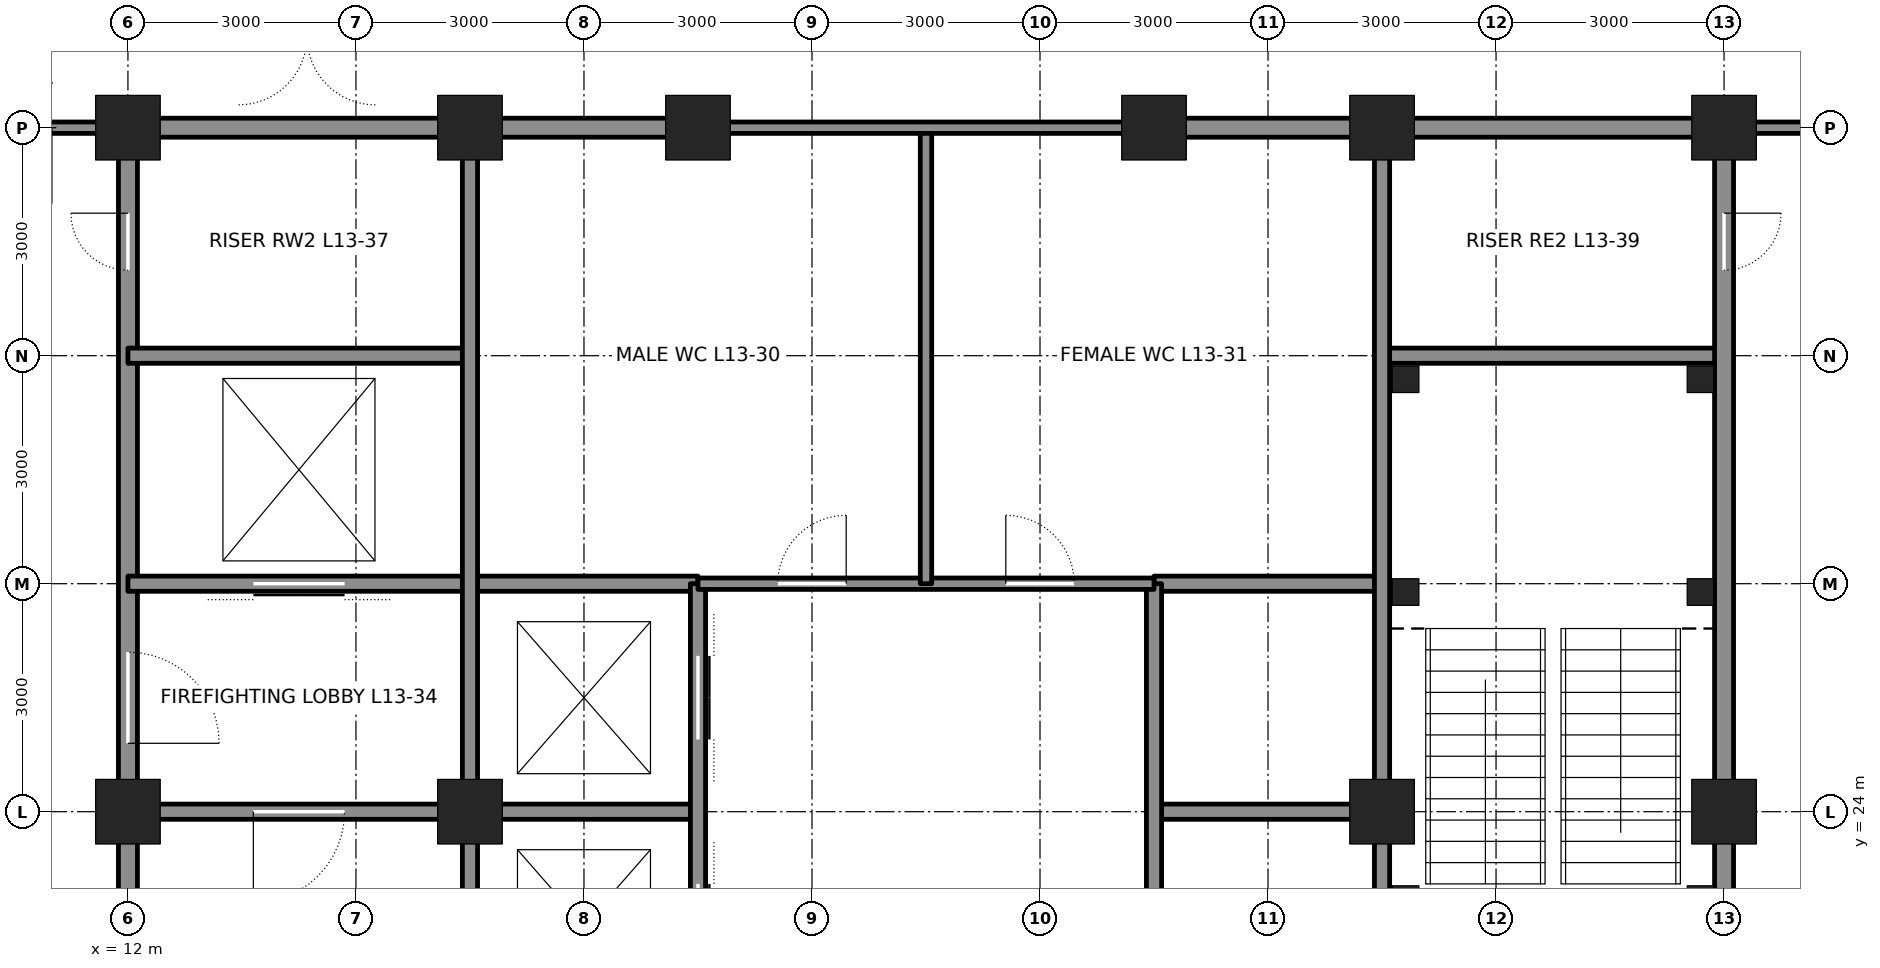
"""IFC4 building model, lengths in metres.
Left out: names, types, materials, properties, quantities, classifications, styles, units other than length and angle.
Written with IfcOpenShell. Run it as: python <this file> out.ifc"""

import sys

from ifc_helpers import new_model, si_unit, direction, frame, frame_2d, origin, origin_2d, place, context, subcontext, project, spatial, rectangle, hollow_rectangle, extrude, element, fill, save


model = new_model("IFC4")
c1 = context("Model", 3, precision=1e-05, world=origin(), true_north=direction((0.0, 1.0)))
c2 = subcontext(c1, "Body", "Model", "MODEL_VIEW")
j1 = project(units=[si_unit("LENGTHUNIT", "METRE"), si_unit("PLANEANGLEUNIT", "RADIAN")], contexts=[c1])
p1 = place(None, origin())
s1 = spatial("IfcSite", under=j1, at=p1, CompositionType="ELEMENT")
p2 = place(p1, origin())
s2 = spatial("IfcBuilding", under=s1, at=p2, CompositionType="ELEMENT")
p3 = place(p2, frame((0.0, 0.0, 64.8)))
s3 = spatial("IfcBuildingStorey", under=s2, at=p3, CompositionType="ELEMENT", Elevation=64.8)
for number, where, z_axis, x_axis in (
    (1, (12.0, 33.0, 0.0), (0.0, 0.0, 1.0), (1.0, 0.0, 0.0)),
    (2, (16.5, 33.0, 0.0), (0.0, 0.0, 1.0), (1.0, 0.0, 0.0)),
    (3, (19.5, 33.0, 0.0), (0.0, 0.0, 1.0), (1.0, 0.0, 0.0)),
    (4, (25.5, 33.0, 0.0), (0.0, 0.0, 1.0), (1.0, 0.0, 0.0)),
    (5, (28.5, 33.0, 0.0), (0.0, 0.0, 1.0), (1.0, 0.0, 0.0)),
    (6, (33.0, 33.0, 0.0), (0.0, 0.0, 1.0), (1.0, 0.0, 0.0)),
    (7, (12.0, 24.0, 0.0), (0.0, 0.0, 1.0), (1.0, 0.0, 0.0)),
    (8, (33.0, 24.0, 0.0), (0.0, 0.0, 1.0), (1.0, 0.0, 0.0)),
    (9, (16.5, 24.0, 0.0), (0.0, 0.0, 1.0), (1.0, 0.0, 0.0)),
    (10, (28.5, 24.0, 0.0), (0.0, 0.0, 1.0), (1.0, 0.0, 0.0)),
):
    element("IfcColumn", number, at=place(p3, frame(where, z_axis=z_axis, x_axis=x_axis)), inside=s3, PredefinedType="COLUMN", context=c2, shape_type="SweptSolid", body=[
        extrude(hollow_rectangle(XDim=0.85, YDim=0.85, WallThickness=0.085, at=origin_2d()), origin(), (0.0, 0.0, 1.0), 4.5),
    ])
p4 = place(p3, frame((12.0, 21.25, 0.0), z_axis=(0.0, 0.0, 1.0), x_axis=(0.0, 1.0, 0.0)))
e11 = element("IfcWall", 11, at=p4, inside=s3, PredefinedType="SOLIDWALL", context=c2, shape_type="SweptSolid", body=[
    extrude(rectangle(XDim=2.5, YDim=0.25, at=frame_2d((1.25, 0.0))), origin(), (0.0, 0.0, 1.0), 3.113),
])
p5 = place(p3, frame((12.0, 24.25, 0.0), z_axis=(0.0, 0.0, 1.0), x_axis=(0.0, 1.0, 0.0)))
e12 = element("IfcWall", 12, at=p5, inside=s3, PredefinedType="SOLIDWALL", context=c2, shape_type="SweptSolid", body=[
    extrude(rectangle(XDim=8.5, YDim=0.25, at=frame_2d((4.25, 0.0))), origin(), (0.0, 0.0, 1.0), 3.113),
])
p6 = place(p5, frame((0.65, 0.0, 0.0)))
e13 = element("IfcOpeningElement", 13, at=p6, cuts=e12, PredefinedType="OPENING", context=c2, shape_type="SweptSolid", body=[
    extrude(rectangle(XDim=1.2, YDim=2.1, at=frame_2d((0.6, 1.05))), frame((0.0, 0.135, 0.0), z_axis=(0.0, -1.0, 0.0), x_axis=(1.0, 0.0, 0.0)), (0.0, 0.0, 1.0), 0.27),
])
p7 = place(p5, frame((6.875, 0.0, 0.0)))
e14 = element("IfcOpeningElement", 14, at=p7, cuts=e12, PredefinedType="OPENING", context=c2, shape_type="SweptSolid", body=[
    extrude(rectangle(XDim=0.75, YDim=2.1, at=frame_2d((0.375, 1.05))), frame((0.0, 0.135, 0.0), z_axis=(0.0, -1.0, 0.0), x_axis=(1.0, 0.0, 0.0)), (0.0, 0.0, 1.0), 0.27),
])
p8 = place(p3, frame((12.25, 24.0, 0.0), z_axis=(0.0, 0.0, 1.0), x_axis=(1.0, 0.0, 0.0)))
e15 = element("IfcWall", 15, at=p8, inside=s3, PredefinedType="SOLIDWALL", context=c2, shape_type="SweptSolid", body=[
    extrude(rectangle(XDim=4.0, YDim=0.2, at=frame_2d((2.0, 0.0))), origin(), (0.0, 0.0, 1.0), 3.39),
])
p9 = place(p8, frame((1.4, 0.0, 0.0)))
e16 = element("IfcOpeningElement", 16, at=p9, cuts=e15, PredefinedType="OPENING", context=c2, shape_type="SweptSolid", body=[
    extrude(rectangle(XDim=1.2, YDim=2.1, at=frame_2d((0.6, 1.05))), frame((0.0, 0.11, 0.0), z_axis=(0.0, -1.0, 0.0), x_axis=(1.0, 0.0, 0.0)), (0.0, 0.0, 1.0), 0.22),
])
for number, where, z_axis, x_axis in (
    (17, (16.75, 24.0, 0.0), (0.0, 0.0, 1.0), (1.0, 0.0, 0.0)),
    (18, (25.5, 24.0, 0.0), (0.0, 0.0, 1.0), (1.0, 0.0, 0.0)),
):
    element("IfcWall", number, at=place(p3, frame(where, z_axis=z_axis, x_axis=x_axis)), inside=s3, PredefinedType="SOLIDWALL", context=c2, shape_type="SweptSolid", body=[
        extrude(rectangle(XDim=2.75, YDim=0.2, at=frame_2d((1.375, 0.0))), origin(), (0.0, 0.0, 1.0), 3.39),
    ])
p10 = place(p3, frame((12.0, 27.0, 0.0), z_axis=(0.0, 0.0, 1.0), x_axis=(1.0, 0.0, 0.0)))
e19 = element("IfcWall", 19, at=p10, inside=s3, PredefinedType="SOLIDWALL", context=c2, shape_type="SweptSolid", body=[
    extrude(rectangle(XDim=7.5, YDim=0.2, at=frame_2d((3.75, 0.0))), origin(), (0.0, 0.0, 1.0), 4.34),
])
p11 = place(p10, frame((1.65, 0.0, 0.0)))
e20 = element("IfcOpeningElement", 20, at=p11, cuts=e19, PredefinedType="OPENING", context=c2, shape_type="SweptSolid", body=[
    extrude(rectangle(XDim=1.2, YDim=2.1, at=frame_2d((0.6, 1.05))), frame((0.0, 0.11, 0.0), z_axis=(0.0, -1.0, 0.0), x_axis=(1.0, 0.0, 0.0)), (0.0, 0.0, 1.0), 0.22),
])
p12 = place(p3, frame((25.5, 27.0, 0.0), z_axis=(0.0, 0.0, 1.0), x_axis=(1.0, 0.0, 0.0)))
e21 = element("IfcWall", 21, at=p12, inside=s3, PredefinedType="SOLIDWALL", context=c2, shape_type="SweptSolid", body=[
    extrude(rectangle(XDim=3.0, YDim=0.2, at=frame_2d((1.5, 0.0))), origin(), (0.0, 0.0, 1.0), 4.34),
])
for number, where, z_axis, x_axis in (
    (22, (12.0, 30.0, 0.0), (0.0, 0.0, 1.0), (1.0, 0.0, 0.0)),
    (23, (28.5, 30.0, 0.0), (0.0, 0.0, 1.0), (1.0, 0.0, 0.0)),
):
    element("IfcWall", number, at=place(p3, frame(where, z_axis=z_axis, x_axis=x_axis)), inside=s3, PredefinedType="SOLIDWALL", context=c2, shape_type="SweptSolid", body=[
        extrude(rectangle(XDim=4.5, YDim=0.2, at=frame_2d((2.25, 0.0))), origin(), (0.0, 0.0, 1.0), 4.34),
    ])
p13 = place(p3, frame((12.25, 33.0, 0.0), z_axis=(0.0, 0.0, 1.0), x_axis=(1.0, 0.0, 0.0)))
e24 = element("IfcWall", 24, at=p13, inside=s3, PredefinedType="SOLIDWALL", context=c2, shape_type="SweptSolid", body=[
    extrude(rectangle(XDim=4.0, YDim=0.25, at=frame_2d((2.0, 0.0))), origin(), (0.0, 0.0, 1.0), 3.181),
])
for number, where, z_axis, x_axis in (
    (25, (16.75, 33.0, 0.0), (0.0, 0.0, 1.0), (1.0, 0.0, 0.0)),
    (26, (25.75, 33.0, 0.0), (0.0, 0.0, 1.0), (1.0, 0.0, 0.0)),
):
    element("IfcWall", number, at=place(p3, frame(where, z_axis=z_axis, x_axis=x_axis)), inside=s3, PredefinedType="SOLIDWALL", context=c2, shape_type="SweptSolid", body=[
        extrude(rectangle(XDim=2.5, YDim=0.25, at=frame_2d((1.25, 0.0))), origin(), (0.0, 0.0, 1.0), 3.181),
    ])
p14 = place(p3, frame((28.75, 33.0, 0.0), z_axis=(0.0, 0.0, 1.0), x_axis=(1.0, 0.0, 0.0)))
e27 = element("IfcWall", 27, at=p14, inside=s3, PredefinedType="SOLIDWALL", context=c2, shape_type="SweptSolid", body=[
    extrude(rectangle(XDim=4.0, YDim=0.25, at=frame_2d((2.0, 0.0))), origin(), (0.0, 0.0, 1.0), 3.181),
])
p15 = place(p3, frame((16.5, 21.25, 0.0), z_axis=(0.0, 0.0, 1.0), x_axis=(0.0, 1.0, 0.0)))
e28 = element("IfcWall", 28, at=p15, inside=s3, PredefinedType="SOLIDWALL", context=c2, shape_type="SweptSolid", body=[
    extrude(rectangle(XDim=2.5, YDim=0.2, at=frame_2d((1.25, 0.0))), origin(), (0.0, 0.0, 1.0), 3.413),
])
p16 = place(p3, frame((16.5, 24.25, 0.0), z_axis=(0.0, 0.0, 1.0), x_axis=(0.0, 1.0, 0.0)))
e29 = element("IfcWall", 29, at=p16, inside=s3, PredefinedType="SOLIDWALL", context=c2, shape_type="SweptSolid", body=[
    extrude(rectangle(XDim=8.5, YDim=0.2, at=frame_2d((4.25, 0.0))), origin(), (0.0, 0.0, 1.0), 3.413),
])
p17 = place(p3, frame((19.5, 15.0, 0.0), z_axis=(0.0, 0.0, 1.0), x_axis=(0.0, 1.0, 0.0)))
e30 = element("IfcWall", 30, at=p17, inside=s3, PredefinedType="SOLIDWALL", context=c2, shape_type="SweptSolid", body=[
    extrude(rectangle(XDim=12.0, YDim=0.2, at=frame_2d((6.0, 0.0))), origin(), (0.0, 0.0, 1.0), 3.365),
])
p18 = place(p17, frame((0.95, 0.0, 0.0)))
e31 = element("IfcOpeningElement", 31, at=p18, cuts=e30, PredefinedType="OPENING", context=c2, shape_type="SweptSolid", body=[
    extrude(rectangle(XDim=1.1, YDim=2.1, at=frame_2d((0.55, 1.05))), frame((0.0, 0.11, 0.0), z_axis=(0.0, -1.0, 0.0), x_axis=(1.0, 0.0, 0.0)), (0.0, 0.0, 1.0), 0.22),
])
p19 = place(p17, frame((3.95, 0.0, 0.0)))
e32 = element("IfcOpeningElement", 32, at=p19, cuts=e30, PredefinedType="OPENING", context=c2, shape_type="SweptSolid", body=[
    extrude(rectangle(XDim=1.1, YDim=2.1, at=frame_2d((0.55, 1.05))), frame((0.0, 0.11, 0.0), z_axis=(0.0, -1.0, 0.0), x_axis=(1.0, 0.0, 0.0)), (0.0, 0.0, 1.0), 0.22),
])
p20 = place(p17, frame((6.95, 0.0, 0.0)))
e33 = element("IfcOpeningElement", 33, at=p20, cuts=e30, PredefinedType="OPENING", context=c2, shape_type="SweptSolid", body=[
    extrude(rectangle(XDim=1.1, YDim=2.1, at=frame_2d((0.55, 1.05))), frame((0.0, 0.11, 0.0), z_axis=(0.0, -1.0, 0.0), x_axis=(1.0, 0.0, 0.0)), (0.0, 0.0, 1.0), 0.22),
])
p21 = place(p17, frame((9.95, 0.0, 0.0)))
e34 = element("IfcOpeningElement", 34, at=p21, cuts=e30, PredefinedType="OPENING", context=c2, shape_type="SweptSolid", body=[
    extrude(rectangle(XDim=1.1, YDim=2.1, at=frame_2d((0.55, 1.05))), frame((0.0, 0.11, 0.0), z_axis=(0.0, -1.0, 0.0), x_axis=(1.0, 0.0, 0.0)), (0.0, 0.0, 1.0), 0.22),
])
p22 = place(p3, frame((25.5, 15.0, 0.0), z_axis=(0.0, 0.0, 1.0), x_axis=(0.0, 1.0, 0.0)))
e35 = element("IfcWall", 35, at=p22, inside=s3, PredefinedType="SOLIDWALL", context=c2, shape_type="SweptSolid", body=[
    extrude(rectangle(XDim=12.0, YDim=0.2, at=frame_2d((6.0, 0.0))), origin(), (0.0, 0.0, 1.0), 3.365),
])
p23 = place(p3, frame((28.5, 21.25, 0.0), z_axis=(0.0, 0.0, 1.0), x_axis=(0.0, 1.0, 0.0)))
e36 = element("IfcWall", 36, at=p23, inside=s3, PredefinedType="SOLIDWALL", context=c2, shape_type="SweptSolid", body=[
    extrude(rectangle(XDim=2.5, YDim=0.2, at=frame_2d((1.25, 0.0))), origin(), (0.0, 0.0, 1.0), 3.413),
])
p24 = place(p3, frame((28.5, 24.25, 0.0), z_axis=(0.0, 0.0, 1.0), x_axis=(0.0, 1.0, 0.0)))
e37 = element("IfcWall", 37, at=p24, inside=s3, PredefinedType="SOLIDWALL", context=c2, shape_type="SweptSolid", body=[
    extrude(rectangle(XDim=8.5, YDim=0.2, at=frame_2d((4.25, 0.0))), origin(), (0.0, 0.0, 1.0), 3.413),
])
p25 = place(p3, frame((33.0, 21.25, 0.0), z_axis=(0.0, 0.0, 1.0), x_axis=(0.0, 1.0, 0.0)))
e38 = element("IfcWall", 38, at=p25, inside=s3, PredefinedType="SOLIDWALL", context=c2, shape_type="SweptSolid", body=[
    extrude(rectangle(XDim=2.5, YDim=0.25, at=frame_2d((1.25, 0.0))), origin(), (0.0, 0.0, 1.0), 3.113),
])
p26 = place(p3, frame((33.0, 24.25, 0.0), z_axis=(0.0, 0.0, 1.0), x_axis=(0.0, 1.0, 0.0)))
e39 = element("IfcWall", 39, at=p26, inside=s3, PredefinedType="SOLIDWALL", context=c2, shape_type="SweptSolid", body=[
    extrude(rectangle(XDim=8.5, YDim=0.25, at=frame_2d((4.25, 0.0))), origin(), (0.0, 0.0, 1.0), 3.113),
])
p27 = place(p26, frame((6.875, 0.0, 0.0)))
e40 = element("IfcOpeningElement", 40, at=p27, cuts=e39, PredefinedType="OPENING", context=c2, shape_type="SweptSolid", body=[
    extrude(rectangle(XDim=0.75, YDim=2.1, at=frame_2d((0.375, 1.05))), frame((0.0, 0.135, 0.0), z_axis=(0.0, -1.0, 0.0), x_axis=(1.0, 0.0, 0.0)), (0.0, 0.0, 1.0), 0.27),
])
p28 = place(p3, frame((19.5, 27.0, 0.0), z_axis=(0.0, 0.0, 1.0), x_axis=(1.0, 0.0, 0.0)))
e41 = element("IfcWall", 41, at=p28, inside=s3, PredefinedType="PARTITIONING", context=c2, shape_type="SweptSolid", body=[
    extrude(rectangle(XDim=6.0, YDim=0.15, at=frame_2d((3.0, 0.0))), origin(), (0.0, 0.0, 1.0), 4.34),
])
p29 = place(p28, frame((1.05, 0.0, 0.0)))
e42 = element("IfcOpeningElement", 42, at=p29, cuts=e41, PredefinedType="OPENING", context=c2, shape_type="SweptSolid", body=[
    extrude(rectangle(XDim=0.9, YDim=2.1, at=frame_2d((0.45, 1.05))), frame((0.0, 0.085, 0.0), z_axis=(0.0, -1.0, 0.0), x_axis=(1.0, 0.0, 0.0)), (0.0, 0.0, 1.0), 0.17),
])
p30 = place(p28, frame((4.05, 0.0, 0.0)))
e43 = element("IfcOpeningElement", 43, at=p30, cuts=e41, PredefinedType="OPENING", context=c2, shape_type="SweptSolid", body=[
    extrude(rectangle(XDim=0.9, YDim=2.1, at=frame_2d((0.45, 1.05))), frame((0.0, 0.085, 0.0), z_axis=(0.0, -1.0, 0.0), x_axis=(1.0, 0.0, 0.0)), (0.0, 0.0, 1.0), 0.17),
])
p31 = place(p3, frame((22.5, 27.0, 0.0), z_axis=(0.0, 0.0, 1.0), x_axis=(0.0, 1.0, 0.0)))
e44 = element("IfcWall", 44, at=p31, inside=s3, PredefinedType="PARTITIONING", context=c2, shape_type="SweptSolid", body=[
    extrude(rectangle(XDim=6.0, YDim=0.15, at=frame_2d((3.0, 0.0))), origin(), (0.0, 0.0, 1.0), 4.34),
])
p32 = place(p3, frame((19.5, 33.0, 0.0), z_axis=(0.0, 0.0, 1.0), x_axis=(1.0, 0.0, 0.0)))
e45 = element("IfcWall", 45, at=p32, inside=s3, PredefinedType="PARTITIONING", context=c2, shape_type="SweptSolid", body=[
    extrude(rectangle(XDim=6.0, YDim=0.15, at=frame_2d((3.0, 0.0))), origin(), (0.0, 0.0, 1.0), 3.181),
])
p33 = place(p3, frame((9.0, 33.0, -0.3), z_axis=(0.0, 0.0, 1.0), x_axis=(1.0, 0.0, 0.0)))
e46 = element("IfcWall", 46, at=p33, inside=s3, PredefinedType="PARTITIONING", context=c2, shape_type="SweptSolid", body=[
    extrude(rectangle(XDim=3.0, YDim=0.15, at=frame_2d((1.5, 0.0))), origin(), (0.0, 0.0, 1.0), 3.481),
])
p34 = place(p33, frame((1.0, 0.0, 0.3)))
e47 = element("IfcOpeningElement", 47, at=p34, cuts=e46, PredefinedType="OPENING", context=c2, shape_type="SweptSolid", body=[
    extrude(rectangle(XDim=1.0, YDim=2.4, at=frame_2d((0.5, 1.2))), frame((0.0, 0.085, 0.0), z_axis=(0.0, -1.0, 0.0), x_axis=(1.0, 0.0, 0.0)), (0.0, 0.0, 1.0), 0.17),
])
p35 = place(p3, frame((33.0, 33.0, -0.3), z_axis=(0.0, 0.0, 1.0), x_axis=(1.0, 0.0, 0.0)))
e48 = element("IfcWall", 48, at=p35, inside=s3, PredefinedType="PARTITIONING", context=c2, shape_type="SweptSolid", body=[
    extrude(rectangle(XDim=1.8, YDim=0.15, at=frame_2d((0.9, 0.0))), origin(), (0.0, 0.0, 1.0), 3.481),
])
for number, where, z_axis, x_axis in (
    (49, (28.81, 29.69, 0.0), (0.0, 0.0, 1.0), (1.0, 0.0, 0.0)),
    (50, (32.69, 29.69, 0.0), (0.0, 0.0, 1.0), (1.0, 0.0, 0.0)),
    (51, (28.81, 26.89, 0.0), (0.0, 0.0, 1.0), (1.0, 0.0, 0.0)),
    (52, (32.69, 26.89, 0.0), (0.0, 0.0, 1.0), (1.0, 0.0, 0.0)),
    (53, (28.81, 22.85, 0.0), (0.0, 0.0, 1.0), (1.0, 0.0, 0.0)),
    (54, (32.69, 22.85, 0.0), (0.0, 0.0, 1.0), (1.0, 0.0, 0.0)),
):
    element("IfcColumn", number, at=place(p3, frame(where, z_axis=z_axis, x_axis=x_axis)), inside=s3, PredefinedType="COLUMN", context=c2, shape_type="SweptSolid", body=[
        extrude(hollow_rectangle(XDim=0.35, YDim=0.35, WallThickness=0.035, at=origin_2d()), origin(), (0.0, 0.0, 1.0), 4.5),
    ])
p36 = place(p9, frame((1.2, 0.0, 0.0), z_axis=(0.0, 0.0, 1.0), x_axis=(-1.0, 0.0, 0.0)))
e55 = element("IfcDoor", 55, at=p36, inside=s3, OperationType="SINGLE_SWING_RIGHT", PredefinedType="DOOR", context=c2, shape_type="SweptSolid", body=[
    extrude(rectangle(XDim=1.2, YDim=2.1, at=frame_2d((0.6, 1.05))), frame((0.0, 0.025, 0.0), z_axis=(0.0, -1.0, 0.0), x_axis=(1.0, 0.0, 0.0)), (0.0, 0.0, 1.0), 0.05),
])
fill(e16, e55)
p37 = place(p6, frame((1.2, 0.0, 0.0), z_axis=(0.0, 0.0, 1.0), x_axis=(-1.0, 0.0, 0.0)))
e56 = element("IfcDoor", 56, at=p37, inside=s3, OperationType="SINGLE_SWING_RIGHT", PredefinedType="DOOR", context=c2, shape_type="SweptSolid", body=[
    extrude(rectangle(XDim=1.2, YDim=2.1, at=frame_2d((0.6, 1.05))), frame((0.0, 0.025, 0.0), z_axis=(0.0, -1.0, 0.0), x_axis=(1.0, 0.0, 0.0)), (0.0, 0.0, 1.0), 0.05),
])
fill(e13, e56)
p38 = place(p11, origin())
e57 = element("IfcDoor", 57, at=p38, inside=s3, OperationType="DOUBLE_DOOR_SLIDING", PredefinedType="DOOR", context=c2, shape_type="SweptSolid", body=[
    extrude(rectangle(XDim=1.2, YDim=2.1, at=frame_2d((0.6, 1.05))), frame((0.0, 0.025, 0.0), z_axis=(0.0, -1.0, 0.0), x_axis=(1.0, 0.0, 0.0)), (0.0, 0.0, 1.0), 0.05),
])
fill(e20, e57)
p39 = place(p7, origin())
e58 = element("IfcDoor", 58, at=p39, inside=s3, OperationType="SINGLE_SWING_RIGHT", PredefinedType="DOOR", context=c2, shape_type="SweptSolid", body=[
    extrude(rectangle(XDim=0.75, YDim=2.1, at=frame_2d((0.375, 1.05))), frame((0.0, 0.025, 0.0), z_axis=(0.0, -1.0, 0.0), x_axis=(1.0, 0.0, 0.0)), (0.0, 0.0, 1.0), 0.05),
])
fill(e14, e58)
p40 = place(p27, frame((0.75, 0.0, 0.0), z_axis=(0.0, 0.0, 1.0), x_axis=(-1.0, 0.0, 0.0)))
e59 = element("IfcDoor", 59, at=p40, inside=s3, OperationType="SINGLE_SWING_LEFT", PredefinedType="DOOR", context=c2, shape_type="SweptSolid", body=[
    extrude(rectangle(XDim=0.75, YDim=2.1, at=frame_2d((0.375, 1.05))), frame((0.0, 0.025, 0.0), z_axis=(0.0, -1.0, 0.0), x_axis=(1.0, 0.0, 0.0)), (0.0, 0.0, 1.0), 0.05),
])
fill(e40, e59)
p41 = place(p29, origin())
e60 = element("IfcDoor", 60, at=p41, inside=s3, OperationType="SINGLE_SWING_RIGHT", PredefinedType="DOOR", context=c2, shape_type="SweptSolid", body=[
    extrude(rectangle(XDim=0.9, YDim=2.1, at=frame_2d((0.45, 1.05))), frame((0.0, 0.025, 0.0), z_axis=(0.0, -1.0, 0.0), x_axis=(1.0, 0.0, 0.0)), (0.0, 0.0, 1.0), 0.05),
])
fill(e42, e60)
p42 = place(p30, origin())
e61 = element("IfcDoor", 61, at=p42, inside=s3, OperationType="SINGLE_SWING_LEFT", PredefinedType="DOOR", context=c2, shape_type="SweptSolid", body=[
    extrude(rectangle(XDim=0.9, YDim=2.1, at=frame_2d((0.45, 1.05))), frame((0.0, 0.025, 0.0), z_axis=(0.0, -1.0, 0.0), x_axis=(1.0, 0.0, 0.0)), (0.0, 0.0, 1.0), 0.05),
])
fill(e43, e61)
p43 = place(p20, origin())
e62 = element("IfcDoor", 62, at=p43, inside=s3, OperationType="DOUBLE_DOOR_SLIDING", PredefinedType="DOOR", context=c2, shape_type="SweptSolid", body=[
    extrude(rectangle(XDim=1.1, YDim=2.1, at=frame_2d((0.55, 1.05))), frame((0.0, 0.025, 0.0), z_axis=(0.0, -1.0, 0.0), x_axis=(1.0, 0.0, 0.0)), (0.0, 0.0, 1.0), 0.05),
])
fill(e33, e62)
p44 = place(p21, origin())
e63 = element("IfcDoor", 63, at=p44, inside=s3, OperationType="DOUBLE_DOOR_SLIDING", PredefinedType="DOOR", context=c2, shape_type="SweptSolid", body=[
    extrude(rectangle(XDim=1.1, YDim=2.1, at=frame_2d((0.55, 1.05))), frame((0.0, 0.025, 0.0), z_axis=(0.0, -1.0, 0.0), x_axis=(1.0, 0.0, 0.0)), (0.0, 0.0, 1.0), 0.05),
])
fill(e34, e63)
save(model, sys.argv[1])
